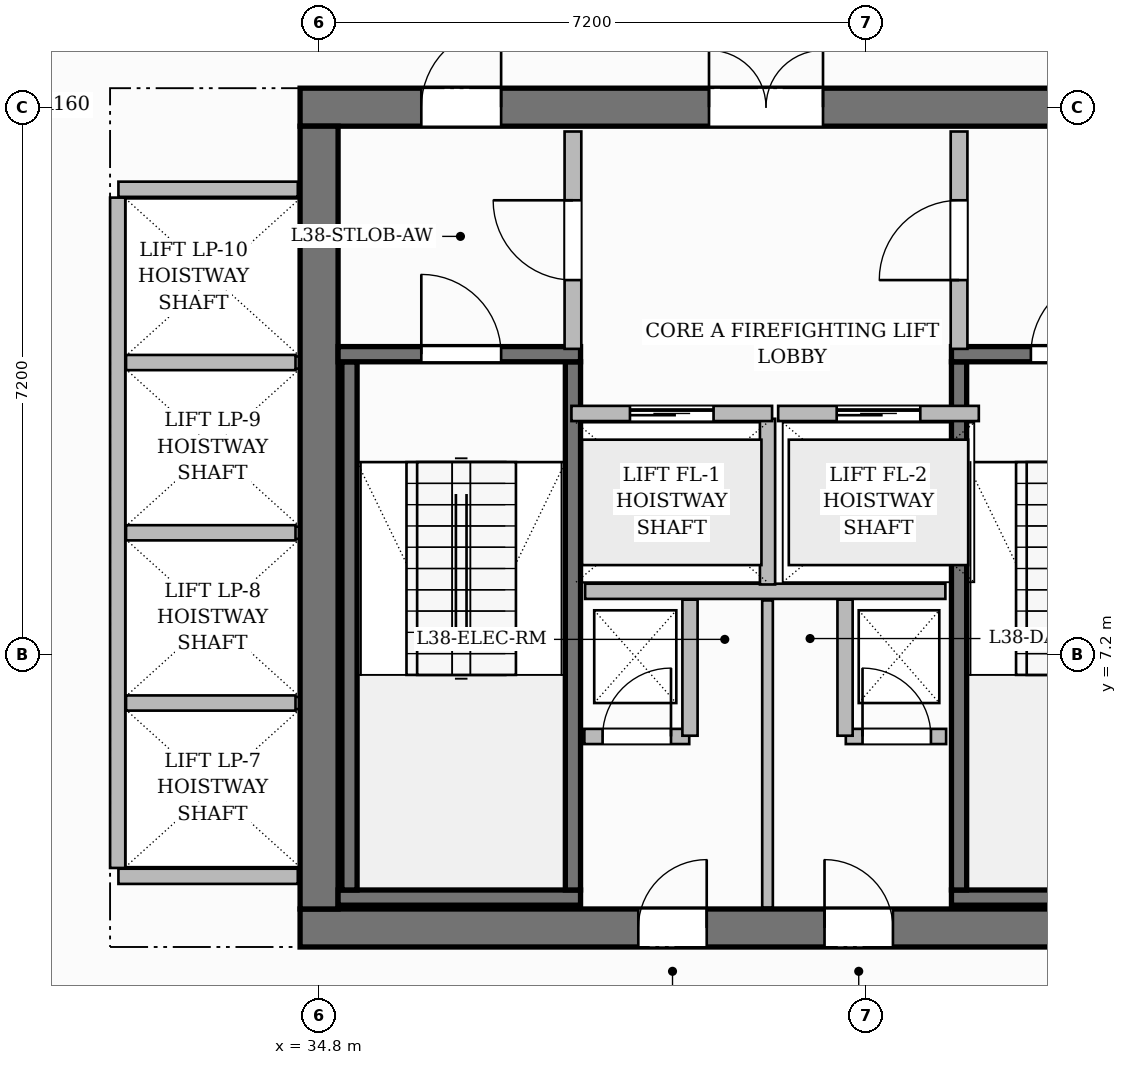
"""IFC4 building model, lengths in metres.
Left out: names, types, materials, properties, quantities, classifications, styles, units other than length and angle.
Written with IfcOpenShell. Run it as: python <this file> out.ifc"""

import sys

from ifc_helpers import new_model, si_unit, direction, frame, frame_2d, origin, place, context, subcontext, project, spatial, rectangle, extrude, source, transform, mapped, element, fill, save


model = new_model("IFC4")
c1 = context("Model", 3, precision=1e-05, world=origin(), true_north=direction((0.0, 1.0)))
c2 = subcontext(c1, "Body", "Model", "MODEL_VIEW")
j1 = project(units=[si_unit("LENGTHUNIT", "METRE"), si_unit("PLANEANGLEUNIT", "RADIAN")], contexts=[c1])
p1 = place(None, origin())
s1 = spatial("IfcSite", under=j1, at=p1, CompositionType="ELEMENT")
p2 = place(p1, origin())
s2 = spatial("IfcBuilding", under=s1, at=p2, CompositionType="ELEMENT")
p3 = place(p2, frame((0.0, 0.0, 154.15)))
s3 = spatial("IfcBuildingStorey", under=s2, at=p3, CompositionType="ELEMENT", Elevation=154.15)
p4 = place(p3, frame((34.55, 3.6, 0.0), z_axis=(0.0, 0.0, 1.0), x_axis=(1.0, 0.0, 0.0)))
e1 = element("IfcWall", 1, at=p4, inside=s3, PredefinedType="SHEAR", context=c2, shape_type="SweptSolid", body=[
    extrude(rectangle(XDim=15.5, YDim=0.5, at=frame_2d((7.75, 0.0))), origin(), (0.0, 0.0, 1.0), 3.85),
])
p5 = place(p4, frame((4.45, 0.0, 0.0)))
e2 = element("IfcOpeningElement", 2, at=p5, cuts=e1, PredefinedType="OPENING", context=c2, shape_type="SweptSolid", body=[
    extrude(rectangle(XDim=0.9, YDim=2.1, at=frame_2d((0.45, 1.05))), frame((0.0, 0.26, 0.0), z_axis=(0.0, -1.0, 0.0), x_axis=(1.0, 0.0, 0.0)), (0.0, 0.0, 1.0), 0.52),
])
p6 = place(p4, frame((6.9, 0.0, 0.0)))
e3 = element("IfcOpeningElement", 3, at=p6, cuts=e1, PredefinedType="OPENING", context=c2, shape_type="SweptSolid", body=[
    extrude(rectangle(XDim=0.9, YDim=2.1, at=frame_2d((0.45, 1.05))), frame((0.0, 0.26, 0.0), z_axis=(0.0, -1.0, 0.0), x_axis=(1.0, 0.0, 0.0)), (0.0, 0.0, 1.0), 0.52),
])
p7 = place(p3, frame((34.55, 14.4, 0.0), z_axis=(0.0, 0.0, 1.0), x_axis=(1.0, 0.0, 0.0)))
e4 = element("IfcWall", 4, at=p7, inside=s3, PredefinedType="SHEAR", context=c2, shape_type="SweptSolid", body=[
    extrude(rectangle(XDim=15.5, YDim=0.5, at=frame_2d((7.75, 0.0))), origin(), (0.0, 0.0, 1.0), 3.85),
])
p8 = place(p7, frame((5.38, 0.0, 0.0)))
e5 = element("IfcOpeningElement", 5, at=p8, cuts=e4, PredefinedType="OPENING", context=c2, shape_type="SweptSolid", body=[
    extrude(rectangle(XDim=1.5, YDim=2.2, at=frame_2d((0.75, 1.1))), frame((0.0, 0.26, 0.0), z_axis=(0.0, -1.0, 0.0), x_axis=(1.0, 0.0, 0.0)), (0.0, 0.0, 1.0), 0.52),
])
p9 = place(p7, frame((1.595, 0.0, 0.0)))
e6 = element("IfcOpeningElement", 6, at=p9, cuts=e4, PredefinedType="OPENING", context=c2, shape_type="SweptSolid", body=[
    extrude(rectangle(XDim=1.05, YDim=2.15, at=frame_2d((0.525, 1.075))), frame((0.0, 0.26, 0.0), z_axis=(0.0, -1.0, 0.0), x_axis=(1.0, 0.0, 0.0)), (0.0, 0.0, 1.0), 0.52),
])
p10 = place(p7, frame((11.225, 0.0, 0.0)))
e7 = element("IfcOpeningElement", 7, at=p10, cuts=e4, PredefinedType="OPENING", context=c2, shape_type="SweptSolid", body=[
    extrude(rectangle(XDim=1.05, YDim=2.15, at=frame_2d((0.525, 1.075))), frame((0.0, 0.26, 0.0), z_axis=(0.0, -1.0, 0.0), x_axis=(1.0, 0.0, 0.0)), (0.0, 0.0, 1.0), 0.52),
])
p11 = place(p3, frame((34.8, 3.85, 0.0), z_axis=(0.0, 0.0, 1.0), x_axis=(0.0, 1.0, 0.0)))
e8 = element("IfcWall", 8, at=p11, inside=s3, PredefinedType="SHEAR", context=c2, shape_type="SweptSolid", body=[
    extrude(rectangle(XDim=10.3, YDim=0.5, at=frame_2d((5.15, 0.0))), origin(), (0.0, 0.0, 1.0), 3.85),
])
p12 = place(p3, frame((35.05, 4.0, 0.0), z_axis=(0.0, 0.0, 1.0), x_axis=(1.0, 0.0, 0.0)))
e9 = element("IfcWall", 9, at=p12, inside=s3, PredefinedType="SHEAR", context=c2, shape_type="SweptSolid", body=[
    extrude(rectangle(XDim=3.19, YDim=0.2, at=frame_2d((1.595, 0.0))), origin(), (0.0, 0.0, 1.0), 3.85),
])
for number, where, z_axis, x_axis in (
    (10, (35.2, 4.1, 0.0), (0.0, 0.0, 1.0), (0.0, 1.0, 0.0)),
    (11, (38.14, 4.1, 0.0), (0.0, 0.0, 1.0), (0.0, 1.0, 0.0)),
):
    element("IfcWall", number, at=place(p3, frame(where, z_axis=z_axis, x_axis=x_axis)), inside=s3, PredefinedType="SHEAR", context=c2, shape_type="SweptSolid", body=[
        extrude(rectangle(XDim=6.95, YDim=0.2, at=frame_2d((3.475, 0.0))), origin(), (0.0, 0.0, 1.0), 3.85),
    ])
p13 = place(p3, frame((35.05, 11.15, 0.0), z_axis=(0.0, 0.0, 1.0), x_axis=(1.0, 0.0, 0.0)))
e12 = element("IfcWall", 12, at=p13, inside=s3, PredefinedType="SHEAR", context=c2, shape_type="SweptSolid", body=[
    extrude(rectangle(XDim=3.19, YDim=0.2, at=frame_2d((1.595, 0.0))), origin(), (0.0, 0.0, 1.0), 3.85),
])
p14 = place(p13, frame((1.095, 0.0, 0.0)))
e13 = element("IfcOpeningElement", 13, at=p14, cuts=e12, PredefinedType="OPENING", context=c2, shape_type="SweptSolid", body=[
    extrude(rectangle(XDim=1.05, YDim=2.2, at=frame_2d((0.525, 1.1))), frame((0.0, 0.11, 0.0), z_axis=(0.0, -1.0, 0.0), x_axis=(1.0, 0.0, 0.0)), (0.0, 0.0, 1.0), 0.22),
])
p15 = place(p3, frame((43.12, 4.0, 0.0), z_axis=(0.0, 0.0, 1.0), x_axis=(1.0, 0.0, 0.0)))
e14 = element("IfcWall", 14, at=p15, inside=s3, PredefinedType="SHEAR", context=c2, shape_type="SweptSolid", body=[
    extrude(rectangle(XDim=6.43, YDim=0.2, at=frame_2d((3.215, 0.0))), origin(), (0.0, 0.0, 1.0), 3.85),
])
p16 = place(p3, frame((43.22, 4.1, 0.0), z_axis=(0.0, 0.0, 1.0), x_axis=(0.0, 1.0, 0.0)))
e15 = element("IfcWall", 15, at=p16, inside=s3, PredefinedType="SHEAR", context=c2, shape_type="SweptSolid", body=[
    extrude(rectangle(XDim=6.95, YDim=0.2, at=frame_2d((3.475, 0.0))), origin(), (0.0, 0.0, 1.0), 3.85),
])
p17 = place(p3, frame((43.12, 11.15, 0.0), z_axis=(0.0, 0.0, 1.0), x_axis=(1.0, 0.0, 0.0)))
e16 = element("IfcWall", 16, at=p17, inside=s3, PredefinedType="SHEAR", context=c2, shape_type="SweptSolid", body=[
    extrude(rectangle(XDim=6.43, YDim=0.2, at=frame_2d((3.215, 0.0))), origin(), (0.0, 0.0, 1.0), 3.85),
])
p18 = place(p17, frame((1.045, 0.0, 0.0)))
e17 = element("IfcOpeningElement", 17, at=p18, cuts=e16, PredefinedType="OPENING", context=c2, shape_type="SweptSolid", body=[
    extrude(rectangle(XDim=1.05, YDim=2.2, at=frame_2d((0.525, 1.1))), frame((0.0, 0.11, 0.0), z_axis=(0.0, -1.0, 0.0), x_axis=(1.0, 0.0, 0.0)), (0.0, 0.0, 1.0), 0.22),
])
p19 = place(p17, frame((4.125, 0.0, 0.0)))
e18 = element("IfcOpeningElement", 18, at=p19, cuts=e16, PredefinedType="OPENING", context=c2, shape_type="SweptSolid", body=[
    extrude(rectangle(XDim=1.05, YDim=2.2, at=frame_2d((0.525, 1.1))), frame((0.0, 0.11, 0.0), z_axis=(0.0, -1.0, 0.0), x_axis=(1.0, 0.0, 0.0)), (0.0, 0.0, 1.0), 0.22),
])
p20 = place(p3, frame((38.3, 8.03, 0.0), z_axis=(0.0, 0.0, 1.0), x_axis=(1.0, 0.0, 0.0)))
e19 = element("IfcWall", 19, at=p20, inside=s3, PredefinedType="PARTITIONING", context=c2, shape_type="SweptSolid", body=[
    extrude(rectangle(XDim=4.74, YDim=0.2, at=frame_2d((2.37, 0.0))), origin(), (0.0, 0.0, 1.0), 3.6),
])
p21 = place(p3, frame((40.7, 8.12, 0.0), z_axis=(0.0, 0.0, 1.0), x_axis=(0.0, 1.0, 0.0)))
e20 = element("IfcWall", 20, at=p21, inside=s3, PredefinedType="PARTITIONING", context=c2, shape_type="SweptSolid", body=[
    extrude(rectangle(XDim=2.18, YDim=0.2, at=frame_2d((1.09, 0.0))), origin(), (0.0, 0.0, 1.0), 3.6),
])
p22 = place(p3, frame((38.14, 11.22, 0.0), z_axis=(0.0, 0.0, 1.0), x_axis=(0.0, 1.0, 0.0)))
e21 = element("IfcWall", 21, at=p22, inside=s3, PredefinedType="PARTITIONING", context=c2, shape_type="SweptSolid", body=[
    extrude(rectangle(XDim=2.86, YDim=0.22, at=frame_2d((1.43, 0.0))), origin(), (0.0, 0.0, 1.0), 3.6),
])
p23 = place(p22, frame((0.905, 0.0, 0.0)))
e22 = element("IfcOpeningElement", 22, at=p23, cuts=e21, PredefinedType="OPENING", context=c2, shape_type="SweptSolid", body=[
    extrude(rectangle(XDim=1.05, YDim=2.15, at=frame_2d((0.525, 1.075))), frame((0.0, 0.12, 0.0), z_axis=(0.0, -1.0, 0.0), x_axis=(1.0, 0.0, 0.0)), (0.0, 0.0, 1.0), 0.24),
])
p24 = place(p3, frame((43.22, 11.22, 0.0), z_axis=(0.0, 0.0, 1.0), x_axis=(0.0, 1.0, 0.0)))
e23 = element("IfcWall", 23, at=p24, inside=s3, PredefinedType="PARTITIONING", context=c2, shape_type="SweptSolid", body=[
    extrude(rectangle(XDim=2.86, YDim=0.22, at=frame_2d((1.43, 0.0))), origin(), (0.0, 0.0, 1.0), 3.6),
])
p25 = place(p24, frame((0.905, 0.0, 0.0)))
e24 = element("IfcOpeningElement", 24, at=p25, cuts=e23, PredefinedType="OPENING", context=c2, shape_type="SweptSolid", body=[
    extrude(rectangle(XDim=1.05, YDim=2.15, at=frame_2d((0.525, 1.075))), frame((0.0, 0.12, 0.0), z_axis=(0.0, -1.0, 0.0), x_axis=(1.0, 0.0, 0.0)), (0.0, 0.0, 1.0), 0.24),
])
p26 = place(p3, frame((38.29, 6.12, 0.0), z_axis=(0.0, 0.0, 1.0), x_axis=(1.0, 0.0, 0.0)))
e25 = element("IfcWall", 25, at=p26, inside=s3, PredefinedType="PARTITIONING", context=c2, shape_type="SweptSolid", body=[
    extrude(rectangle(XDim=1.38, YDim=0.2, at=frame_2d((0.69, 0.0))), origin(), (0.0, 0.0, 1.0), 3.6),
])
p27 = place(p26, frame((0.24, 0.0, 0.0)))
e26 = element("IfcOpeningElement", 26, at=p27, cuts=e25, PredefinedType="OPENING", context=c2, shape_type="SweptSolid", body=[
    extrude(rectangle(XDim=0.9, YDim=2.1, at=frame_2d((0.45, 1.05))), frame((0.0, 0.11, 0.0), z_axis=(0.0, -1.0, 0.0), x_axis=(1.0, 0.0, 0.0)), (0.0, 0.0, 1.0), 0.22),
])
p28 = place(p3, frame((39.68, 6.13, 0.0), z_axis=(0.0, 0.0, 1.0), x_axis=(0.0, 1.0, 0.0)))
e27 = element("IfcWall", 27, at=p28, inside=s3, PredefinedType="PARTITIONING", context=c2, shape_type="SweptSolid", body=[
    extrude(rectangle(XDim=1.79, YDim=0.2, at=frame_2d((0.895, 0.0))), origin(), (0.0, 0.0, 1.0), 3.6),
])
p29 = place(p3, frame((41.73, 6.12, 0.0), z_axis=(0.0, 0.0, 1.0), x_axis=(1.0, 0.0, 0.0)))
e28 = element("IfcWall", 28, at=p29, inside=s3, PredefinedType="PARTITIONING", context=c2, shape_type="SweptSolid", body=[
    extrude(rectangle(XDim=1.32, YDim=0.2, at=frame_2d((0.66, 0.0))), origin(), (0.0, 0.0, 1.0), 3.6),
])
p30 = place(p29, frame((0.22, 0.0, 0.0)))
e29 = element("IfcOpeningElement", 29, at=p30, cuts=e28, PredefinedType="OPENING", context=c2, shape_type="SweptSolid", body=[
    extrude(rectangle(XDim=0.9, YDim=2.1, at=frame_2d((0.45, 1.05))), frame((0.0, 0.11, 0.0), z_axis=(0.0, -1.0, 0.0), x_axis=(1.0, 0.0, 0.0)), (0.0, 0.0, 1.0), 0.22),
])
p31 = place(p3, frame((41.72, 6.13, 0.0), z_axis=(0.0, 0.0, 1.0), x_axis=(0.0, 1.0, 0.0)))
e30 = element("IfcWall", 30, at=p31, inside=s3, PredefinedType="PARTITIONING", context=c2, shape_type="SweptSolid", body=[
    extrude(rectangle(XDim=1.79, YDim=0.2, at=frame_2d((0.895, 0.0))), origin(), (0.0, 0.0, 1.0), 3.6),
])
p32 = place(p3, frame((40.7, 3.87, 0.0), z_axis=(0.0, 0.0, 1.0), x_axis=(0.0, 1.0, 0.0)))
e31 = element("IfcWall", 31, at=p32, inside=s3, PredefinedType="PARTITIONING", context=c2, shape_type="SweptSolid", body=[
    extrude(rectangle(XDim=4.04, YDim=0.14, at=frame_2d((2.02, 0.0))), origin(), (0.0, 0.0, 1.0), 3.6),
])
for number, where, z_axis, x_axis in (
    (32, (32.16, 4.28, 0.0), (0.0, 0.0, 1.0), (1.0, 0.0, 0.0)),
    (33, (32.16, 13.32, 0.0), (0.0, 0.0, 1.0), (1.0, 0.0, 0.0)),
):
    element("IfcWall", number, at=place(p3, frame(where, z_axis=z_axis, x_axis=x_axis)), inside=s3, PredefinedType="PARTITIONING", context=c2, shape_type="SweptSolid", body=[
        extrude(rectangle(XDim=2.36, YDim=0.2, at=frame_2d((1.18, 0.0))), origin(), (0.0, 0.0, 1.0), 3.6),
    ])
p33 = place(p3, frame((32.15, 4.39, 0.0), z_axis=(0.0, 0.0, 1.0), x_axis=(0.0, 1.0, 0.0)))
e34 = element("IfcWall", 34, at=p33, inside=s3, PredefinedType="PARTITIONING", context=c2, shape_type="SweptSolid", body=[
    extrude(rectangle(XDim=8.82, YDim=0.2, at=frame_2d((4.41, 0.0))), origin(), (0.0, 0.0, 1.0), 3.6),
])
for number, where, z_axis, x_axis in (
    (35, (32.26, 6.56, 0.0), (0.0, 0.0, 1.0), (1.0, 0.0, 0.0)),
    (36, (32.26, 8.8, 0.0), (0.0, 0.0, 1.0), (1.0, 0.0, 0.0)),
    (37, (32.26, 11.04, 0.0), (0.0, 0.0, 1.0), (1.0, 0.0, 0.0)),
):
    element("IfcWall", number, at=place(p3, frame(where, z_axis=z_axis, x_axis=x_axis)), inside=s3, PredefinedType="PARTITIONING", context=c2, shape_type="SweptSolid", body=[
        extrude(rectangle(XDim=2.23, YDim=0.2, at=frame_2d((1.115, 0.0))), origin(), (0.0, 0.0, 1.0), 3.6),
    ])
p34 = place(p3, frame((38.12, 10.37, 0.0), z_axis=(0.0, 0.0, 1.0), x_axis=(1.0, 0.0, 0.0)))
e38 = element("IfcWall", 38, at=p34, inside=s3, PredefinedType="PARTITIONING", context=c2, shape_type="SweptSolid", body=[
    extrude(rectangle(XDim=2.64, YDim=0.2, at=frame_2d((1.32, 0.0))), origin(), (0.0, 0.0, 1.0), 3.6),
])
p35 = place(p34, frame((0.77, 0.0, 0.0)))
e39 = element("IfcOpeningElement", 39, at=p35, cuts=e38, PredefinedType="OPENING", context=c2, shape_type="SweptSolid", body=[
    extrude(rectangle(XDim=1.1, YDim=2.2, at=frame_2d((0.55, 1.1))), frame((0.0, 0.11, 0.0), z_axis=(0.0, -1.0, 0.0), x_axis=(1.0, 0.0, 0.0)), (0.0, 0.0, 1.0), 0.22),
])
p36 = place(p3, frame((40.84, 10.37, 0.0), z_axis=(0.0, 0.0, 1.0), x_axis=(1.0, 0.0, 0.0)))
e40 = element("IfcWall", 40, at=p36, inside=s3, PredefinedType="PARTITIONING", context=c2, shape_type="SweptSolid", body=[
    extrude(rectangle(XDim=2.64, YDim=0.2, at=frame_2d((1.32, 0.0))), origin(), (0.0, 0.0, 1.0), 3.6),
])
p37 = place(p36, frame((0.77, 0.0, 0.0)))
e41 = element("IfcOpeningElement", 41, at=p37, cuts=e40, PredefinedType="OPENING", context=c2, shape_type="SweptSolid", body=[
    extrude(rectangle(XDim=1.1, YDim=2.2, at=frame_2d((0.55, 1.1))), frame((0.0, 0.11, 0.0), z_axis=(0.0, -1.0, 0.0), x_axis=(1.0, 0.0, 0.0)), (0.0, 0.0, 1.0), 0.22),
])
m1 = source(origin(), c2, "Body", "SweptSolid", [
    extrude(rectangle(XDim=1.05, YDim=2.2, at=frame_2d((0.525, 1.1))), frame((0.0, 0.025, 0.0), z_axis=(0.0, -1.0, 0.0), x_axis=(1.0, 0.0, 0.0)), (0.0, 0.0, 1.0), 0.05),
])
p38 = place(p14, origin())
e42 = element("IfcDoor", 42, at=p38, inside=s3, OperationType="SINGLE_SWING_LEFT", PredefinedType="DOOR", context=c2, shape_type="MappedRepresentation", body=[
    mapped(m1, transform((0.0, 0.0, 0.0), scale=1.0)),
])
fill(e13, e42)
p39 = place(p18, origin())
e43 = element("IfcDoor", 43, at=p39, inside=s3, OperationType="SINGLE_SWING_RIGHT", PredefinedType="DOOR", context=c2, shape_type="MappedRepresentation", body=[
    mapped(m1, transform((0.0, 0.0, 0.0), scale=1.0)),
])
fill(e17, e43)
m2 = source(origin(), c2, "Body", "SweptSolid", [
    extrude(rectangle(XDim=1.05, YDim=2.15, at=frame_2d((0.525, 1.075))), frame((0.0, 0.025, 0.0), z_axis=(0.0, -1.0, 0.0), x_axis=(1.0, 0.0, 0.0)), (0.0, 0.0, 1.0), 0.05),
])
p40 = place(p23, origin())
e44 = element("IfcDoor", 44, at=p40, inside=s3, OperationType="SINGLE_SWING_RIGHT", PredefinedType="DOOR", context=c2, shape_type="MappedRepresentation", body=[
    mapped(m2, transform((0.0, 0.0, 0.0), scale=1.0)),
])
fill(e22, e44)
p41 = place(p25, origin())
e45 = element("IfcDoor", 45, at=p41, inside=s3, OperationType="SINGLE_SWING_LEFT", PredefinedType="DOOR", context=c2, shape_type="MappedRepresentation", body=[
    mapped(m2, transform((0.0, 0.0, 0.0), scale=1.0)),
])
fill(e24, e45)
m3 = source(origin(), c2, "Body", "SweptSolid", [
    extrude(rectangle(XDim=1.5, YDim=2.2, at=frame_2d((0.75, 1.1))), frame((0.0, 0.025, 0.0), z_axis=(0.0, -1.0, 0.0), x_axis=(1.0, 0.0, 0.0)), (0.0, 0.0, 1.0), 0.05),
])
p42 = place(p8, origin())
e46 = element("IfcDoor", 46, at=p42, inside=s3, OperationType="DOUBLE_DOOR_SINGLE_SWING", PredefinedType="DOOR", context=c2, shape_type="MappedRepresentation", body=[
    mapped(m3, transform((0.0, 0.0, 0.0), scale=1.0)),
])
fill(e5, e46)
p43 = place(p9, origin())
e47 = element("IfcDoor", 47, at=p43, inside=s3, OperationType="SINGLE_SWING_RIGHT", PredefinedType="DOOR", context=c2, shape_type="MappedRepresentation", body=[
    mapped(m2, transform((0.0, 0.0, 0.0), scale=1.0)),
])
fill(e6, e47)
m4 = source(origin(), c2, "Body", "SweptSolid", [
    extrude(rectangle(XDim=0.9, YDim=2.1, at=frame_2d((0.45, 1.05))), frame((0.0, 0.025, 0.0), z_axis=(0.0, -1.0, 0.0), x_axis=(1.0, 0.0, 0.0)), (0.0, 0.0, 1.0), 0.05),
])
p44 = place(p27, origin())
e48 = element("IfcDoor", 48, at=p44, inside=s3, OperationType="SINGLE_SWING_RIGHT", PredefinedType="DOOR", context=c2, shape_type="MappedRepresentation", body=[
    mapped(m4, transform((0.0, 0.0, 0.0), scale=1.0)),
])
fill(e26, e48)
p45 = place(p30, origin())
e49 = element("IfcDoor", 49, at=p45, inside=s3, OperationType="SINGLE_SWING_LEFT", PredefinedType="DOOR", context=c2, shape_type="MappedRepresentation", body=[
    mapped(m4, transform((0.0, 0.0, 0.0), scale=1.0)),
])
fill(e29, e49)
p46 = place(p5, origin())
e50 = element("IfcDoor", 50, at=p46, inside=s3, OperationType="SINGLE_SWING_RIGHT", PredefinedType="DOOR", context=c2, shape_type="MappedRepresentation", body=[
    mapped(m4, transform((0.0, 0.0, 0.0), scale=1.0)),
])
fill(e2, e50)
p47 = place(p6, origin())
e51 = element("IfcDoor", 51, at=p47, inside=s3, OperationType="SINGLE_SWING_LEFT", PredefinedType="DOOR", context=c2, shape_type="MappedRepresentation", body=[
    mapped(m4, transform((0.0, 0.0, 0.0), scale=1.0)),
])
fill(e3, e51)
m5 = source(origin(), c2, "Body", "SweptSolid", [
    extrude(rectangle(XDim=1.1, YDim=2.2, at=frame_2d((0.55, 1.1))), frame((0.0, 0.025, 0.0), z_axis=(0.0, -1.0, 0.0), x_axis=(1.0, 0.0, 0.0)), (0.0, 0.0, 1.0), 0.05),
])
p48 = place(p35, origin())
e52 = element("IfcDoor", 52, at=p48, inside=s3, OperationType="SLIDING_TO_LEFT", PredefinedType="DOOR", context=c2, shape_type="MappedRepresentation", body=[
    mapped(m5, transform((0.0, 0.0, 0.0), scale=1.0)),
])
fill(e39, e52)
p49 = place(p37, origin())
e53 = element("IfcDoor", 53, at=p49, inside=s3, OperationType="SLIDING_TO_LEFT", PredefinedType="DOOR", context=c2, shape_type="MappedRepresentation", body=[
    mapped(m5, transform((0.0, 0.0, 0.0), scale=1.0)),
])
fill(e41, e53)
save(model, sys.argv[1])
